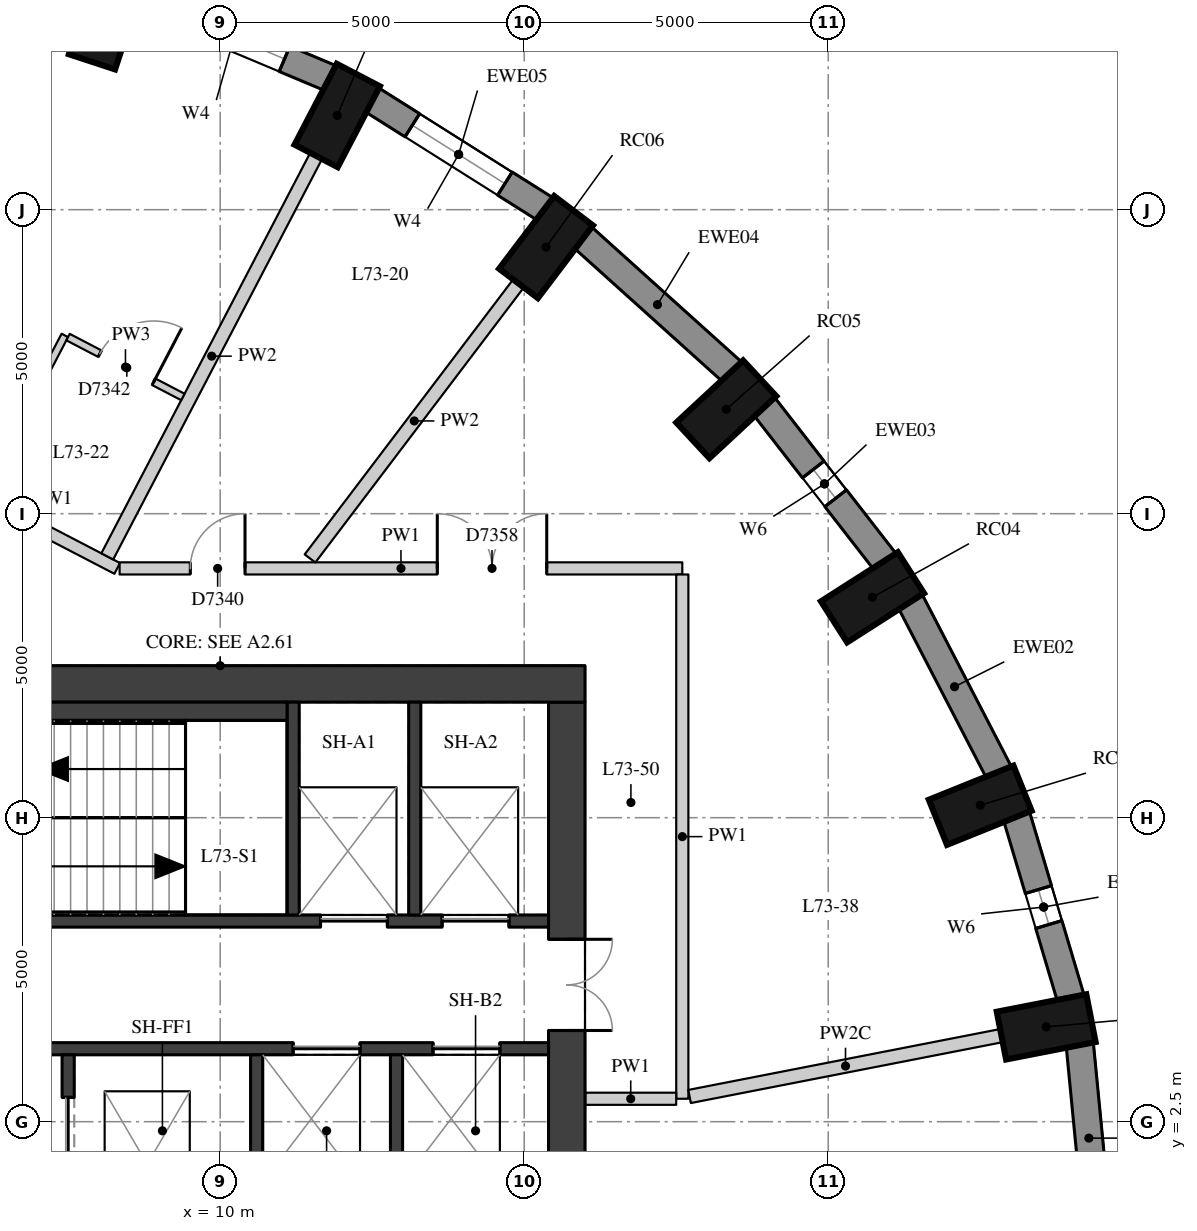
"""IFC4 building model, lengths in metres.
Left out: names, types, materials, properties, quantities, classifications, styles, units other than length and angle.
Written with IfcOpenShell. Run it as: python <this file> out.ifc"""

import sys

from ifc_helpers import new_model, si_unit, direction, frame, frame_2d, origin, origin_2d, place, context, subcontext, project, spatial, rectangle, extrude, element, fill, save


model = new_model("IFC4")
c1 = context("Model", 3, precision=1e-05, world=origin(), true_north=direction((0.0, 1.0)))
c2 = subcontext(c1, "Body", "Model", "MODEL_VIEW")
j1 = project(units=[si_unit("LENGTHUNIT", "METRE"), si_unit("PLANEANGLEUNIT", "RADIAN")], contexts=[c1])
p1 = place(None, origin())
s1 = spatial("IfcSite", under=j1, at=p1, CompositionType="ELEMENT")
p2 = place(p1, origin())
s2 = spatial("IfcBuilding", under=s1, at=p2, CompositionType="ELEMENT")
p3 = place(p2, frame((0.0, 0.0, 256.4)))
s3 = spatial("IfcBuildingStorey", under=s2, at=p3, CompositionType="ELEMENT", Elevation=256.4)
for number, where, z_axis, x_axis in (
    (1, (23.585, 4.06, 0.0), (0.0, 0.0, 1.0), (0.981, 0.192, 0.0)),
    (2, (22.5, 7.705, 0.0), (0.0, 0.0, 1.0), (0.928, 0.374, 0.0)),
    (3, (20.728, 11.125, 0.0), (0.0, 0.0, 1.0), (0.843, 0.539, 0.0)),
    (4, (18.323, 14.216, 0.0), (0.0, 0.0, 1.0), (0.733, 0.681, 0.0)),
    (5, (15.359, 16.885, 0.0), (0.0, 0.0, 1.0), (0.604, 0.797, 0.0)),
    (6, (11.925, 19.05, 0.0), (0.0, 0.0, 1.0), (0.462, 0.887, 0.0)),
    (7, (8.125, 20.644, 0.0), (0.0, 0.0, 1.0), (0.312, 0.95, 0.0)),
):
    element("IfcColumn", number, at=place(p3, frame(where, z_axis=z_axis, x_axis=x_axis)), inside=s3, PredefinedType="COLUMN", context=c2, shape_type="SweptSolid", body=[
        extrude(rectangle(XDim=1.5, YDim=0.8, at=origin_2d()), origin(), (0.0, 0.0, 1.0), 3.3),
    ])
p4 = place(p3, frame((24.437, 0.68, 0.0), z_axis=(0.0, 0.0, 1.0), x_axis=(-0.096740086873, 0.995309678237, 0.0)))
e8 = element("IfcWall", 8, at=p4, inside=s3, PredefinedType="SOLIDWALL", context=c2, shape_type="SweptSolid", body=[
    extrude(rectangle(XDim=3.114, YDim=0.45, at=frame_2d((1.557, 0.0))), origin(), (0.0, 0.0, 1.0), 2.95),
])
p5 = place(p3, frame((23.99, 4.526, 0.0), z_axis=(0.0, 0.0, 1.0), x_axis=(-0.285263800865, 0.958449040855, 0.0)))
e9 = element("IfcWall", 9, at=p5, inside=s3, PredefinedType="SOLIDWALL", context=c2, shape_type="SweptSolid", body=[
    extrude(rectangle(XDim=3.139, YDim=0.45, at=frame_2d((1.57, 0.0))), origin(), (0.0, 0.0, 1.0), 2.95),
])
p6 = place(p5, frame((1.27, 0.0, 0.4)))
e10 = element("IfcOpeningElement", 10, at=p6, cuts=e9, PredefinedType="OPENING", context=c2, shape_type="SweptSolid", body=[
    extrude(rectangle(XDim=0.6, YDim=1.75, at=frame_2d((0.3, 0.875))), frame((0.0, 0.235, 0.0), z_axis=(0.0, -1.0, 0.0), x_axis=(1.0, 0.0, 0.0)), (0.0, 0.0, 1.0), 0.47),
])
p7 = place(p3, frame((22.81, 8.24, 0.0), z_axis=(0.0, 0.0, 1.0), x_axis=(-0.459889857669, 0.887975967475, 0.0)))
e11 = element("IfcWall", 11, at=p7, inside=s3, PredefinedType="SOLIDWALL", context=c2, shape_type="SweptSolid", body=[
    extrude(rectangle(XDim=3.186, YDim=0.45, at=frame_2d((1.593, 0.0))), origin(), (0.0, 0.0, 1.0), 2.95),
])
p8 = place(p3, frame((20.935, 11.708, 0.0), z_axis=(0.0, 0.0, 1.0), x_axis=(-0.613862536705, 0.789412937587, 0.0)))
e12 = element("IfcWall", 12, at=p8, inside=s3, PredefinedType="SOLIDWALL", context=c2, shape_type="SweptSolid", body=[
    extrude(rectangle(XDim=3.247, YDim=0.45, at=frame_2d((1.624, 0.0))), origin(), (0.0, 0.0, 1.0), 2.95),
])
p9 = place(p8, frame((1.324, 0.0, 0.4)))
e13 = element("IfcOpeningElement", 13, at=p9, cuts=e12, PredefinedType="OPENING", context=c2, shape_type="SweptSolid", body=[
    extrude(rectangle(XDim=0.6, YDim=1.75, at=frame_2d((0.3, 0.875))), frame((0.0, 0.235, 0.0), z_axis=(0.0, -1.0, 0.0), x_axis=(1.0, 0.0, 0.0)), (0.0, 0.0, 1.0), 0.47),
])
p10 = place(p3, frame((18.424, 14.828, 0.0), z_axis=(0.0, 0.0, 1.0), x_axis=(-0.743166014219, 0.669107073128, 0.0)))
e14 = element("IfcWall", 14, at=p10, inside=s3, PredefinedType="SOLIDWALL", context=c2, shape_type="SweptSolid", body=[
    extrude(rectangle(XDim=3.316, YDim=0.45, at=frame_2d((1.658, 0.0))), origin(), (0.0, 0.0, 1.0), 2.95),
])
p11 = place(p3, frame((15.353, 17.506, 0.0), z_axis=(0.0, 0.0, 1.0), x_axis=(-0.845929139811, 0.53329531258, 0.0)))
e15 = element("IfcWall", 15, at=p11, inside=s3, PredefinedType="SOLIDWALL", context=c2, shape_type="SweptSolid", body=[
    extrude(rectangle(XDim=3.385, YDim=0.45, at=frame_2d((1.692, 0.0))), origin(), (0.0, 0.0, 1.0), 2.95),
])
p12 = place(p11, frame((0.792, 0.0, 0.4)))
e16 = element("IfcOpeningElement", 16, at=p12, cuts=e15, PredefinedType="OPENING", context=c2, shape_type="SweptSolid", body=[
    extrude(rectangle(XDim=1.8, YDim=1.75, at=frame_2d((0.9, 0.875))), frame((0.0, 0.235, 0.0), z_axis=(0.0, -1.0, 0.0), x_axis=(1.0, 0.0, 0.0)), (0.0, 0.0, 1.0), 0.47),
])
p13 = place(p3, frame((11.816, 19.662, 0.0), z_axis=(0.0, 0.0, 1.0), x_axis=(-0.922024627475, 0.387131226239, 0.0)))
e17 = element("IfcWall", 17, at=p13, inside=s3, PredefinedType="SOLIDWALL", context=c2, shape_type="SweptSolid", body=[
    extrude(rectangle(XDim=3.443, YDim=0.45, at=frame_2d((1.722, 0.0))), origin(), (0.0, 0.0, 1.0), 2.95),
])
p14 = place(p13, frame((0.822, 0.0, 0.4)))
e18 = element("IfcOpeningElement", 18, at=p14, cuts=e17, PredefinedType="OPENING", context=c2, shape_type="SweptSolid", body=[
    extrude(rectangle(XDim=1.8, YDim=1.75, at=frame_2d((0.9, 0.875))), frame((0.0, 0.235, 0.0), z_axis=(0.0, -1.0, 0.0), x_axis=(1.0, 0.0, 0.0)), (0.0, 0.0, 1.0), 0.47),
])
p15 = place(p3, frame((15.7, -9.4, 0.0), z_axis=(0.0, 0.0, 1.0), x_axis=(0.0, 1.0, 0.0)))
e19 = element("IfcWall", 19, at=p15, inside=s3, PredefinedType="SHEAR", context=c2, shape_type="SweptSolid", body=[
    extrude(rectangle(XDim=18.8, YDim=0.6, at=frame_2d((9.4, 0.0))), origin(), (0.0, 0.0, 1.0), 2.95),
])
p16 = place(p15, frame((13.4, 0.0, 0.0)))
e20 = element("IfcOpeningElement", 20, at=p16, cuts=e19, PredefinedType="OPENING", context=c2, shape_type="SweptSolid", body=[
    extrude(rectangle(XDim=1.5, YDim=2.1, at=frame_2d((0.75, 1.05))), frame((0.0, 0.31, 0.0), z_axis=(0.0, -1.0, 0.0), x_axis=(1.0, 0.0, 0.0)), (0.0, 0.0, 1.0), 0.62),
])
p17 = place(p15, frame((3.9, 0.0, 0.0)))
e21 = element("IfcOpeningElement", 21, at=p17, cuts=e19, PredefinedType="OPENING", context=c2, shape_type="SweptSolid", body=[
    extrude(rectangle(XDim=1.5, YDim=2.1, at=frame_2d((0.75, 1.05))), frame((0.0, 0.31, 0.0), z_axis=(0.0, -1.0, 0.0), x_axis=(1.0, 0.0, 0.0)), (0.0, 0.0, 1.0), 0.62),
])
p18 = place(p3, frame((4.0, 9.7, 0.0), z_axis=(0.0, 0.0, 1.0), x_axis=(1.0, 0.0, 0.0)))
e22 = element("IfcWall", 22, at=p18, inside=s3, PredefinedType="SHEAR", context=c2, shape_type="SweptSolid", body=[
    extrude(rectangle(XDim=12.0, YDim=0.6, at=frame_2d((6.0, 0.0))), origin(), (0.0, 0.0, 1.0), 2.95),
])
p19 = place(p3, frame((4.6, 5.8, 0.0), z_axis=(0.0, 0.0, 1.0), x_axis=(1.0, 0.0, 0.0)))
e23 = element("IfcWall", 23, at=p19, inside=s3, PredefinedType="SHEAR", context=c2, shape_type="SweptSolid", body=[
    extrude(rectangle(XDim=10.8, YDim=0.2, at=frame_2d((5.4, 0.0))), origin(), (0.0, 0.0, 1.0), 2.95),
])
p20 = place(p19, frame((7.05, 0.0, 0.0)))
e24 = element("IfcOpeningElement", 24, at=p20, cuts=e23, PredefinedType="OPENING", context=c2, shape_type="SweptSolid", body=[
    extrude(rectangle(XDim=1.1, YDim=2.1, at=frame_2d((0.55, 1.05))), frame((0.0, 0.11, 0.0), z_axis=(0.0, -1.0, 0.0), x_axis=(1.0, 0.0, 0.0)), (0.0, 0.0, 1.0), 0.22),
])
p21 = place(p19, frame((9.05, 0.0, 0.0)))
e25 = element("IfcOpeningElement", 25, at=p21, cuts=e23, PredefinedType="OPENING", context=c2, shape_type="SweptSolid", body=[
    extrude(rectangle(XDim=1.1, YDim=2.1, at=frame_2d((0.55, 1.05))), frame((0.0, 0.11, 0.0), z_axis=(0.0, -1.0, 0.0), x_axis=(1.0, 0.0, 0.0)), (0.0, 0.0, 1.0), 0.22),
])
p22 = place(p3, frame((4.6, 3.7, 0.0), z_axis=(0.0, 0.0, 1.0), x_axis=(1.0, 0.0, 0.0)))
e26 = element("IfcWall", 26, at=p22, inside=s3, PredefinedType="SHEAR", context=c2, shape_type="SweptSolid", body=[
    extrude(rectangle(XDim=10.8, YDim=0.2, at=frame_2d((5.4, 0.0))), origin(), (0.0, 0.0, 1.0), 2.95),
])
p23 = place(p22, frame((6.6, 0.0, 0.0)))
e27 = element("IfcOpeningElement", 27, at=p23, cuts=e26, PredefinedType="OPENING", context=c2, shape_type="SweptSolid", body=[
    extrude(rectangle(XDim=1.1, YDim=2.1, at=frame_2d((0.55, 1.05))), frame((0.0, 0.11, 0.0), z_axis=(0.0, -1.0, 0.0), x_axis=(1.0, 0.0, 0.0)), (0.0, 0.0, 1.0), 0.22),
])
p24 = place(p22, frame((8.9, 0.0, 0.0)))
e28 = element("IfcOpeningElement", 28, at=p24, cuts=e26, PredefinedType="OPENING", context=c2, shape_type="SweptSolid", body=[
    extrude(rectangle(XDim=1.1, YDim=2.1, at=frame_2d((0.55, 1.05))), frame((0.0, 0.11, 0.0), z_axis=(0.0, -1.0, 0.0), x_axis=(1.0, 0.0, 0.0)), (0.0, 0.0, 1.0), 0.22),
])
for number, where, z_axis, x_axis in (
    (29, (11.2, 5.9, 0.0), (0.0, 0.0, 1.0), (0.0, 1.0, 0.0)),
    (30, (13.2, 5.9, 0.0), (0.0, 0.0, 1.0), (0.0, 1.0, 0.0)),
):
    element("IfcWall", number, at=place(p3, frame(where, z_axis=z_axis, x_axis=x_axis)), inside=s3, PredefinedType="SHEAR", context=c2, shape_type="SweptSolid", body=[
        extrude(rectangle(XDim=3.5, YDim=0.2, at=frame_2d((1.75, 0.0))), origin(), (0.0, 0.0, 1.0), 2.95),
    ])
p25 = place(p3, frame((7.5, 1.1, 0.0), z_axis=(0.0, 0.0, 1.0), x_axis=(0.0, 1.0, 0.0)))
e31 = element("IfcWall", 31, at=p25, inside=s3, PredefinedType="SHEAR", context=c2, shape_type="SweptSolid", body=[
    extrude(rectangle(XDim=2.5, YDim=0.2, at=frame_2d((1.25, 0.0))), origin(), (0.0, 0.0, 1.0), 2.95),
])
p26 = place(p25, frame((0.7, 0.0, 0.0)))
e32 = element("IfcOpeningElement", 32, at=p26, cuts=e31, PredefinedType="OPENING", context=c2, shape_type="SweptSolid", body=[
    extrude(rectangle(XDim=1.1, YDim=2.1, at=frame_2d((0.55, 1.05))), frame((0.0, 0.11, 0.0), z_axis=(0.0, -1.0, 0.0), x_axis=(1.0, 0.0, 0.0)), (0.0, 0.0, 1.0), 0.22),
])
for number, where, z_axis, x_axis in (
    (33, (10.6, 1.1, 0.0), (0.0, 0.0, 1.0), (0.0, 1.0, 0.0)),
    (34, (12.9, 1.1, 0.0), (0.0, 0.0, 1.0), (0.0, 1.0, 0.0)),
):
    element("IfcWall", number, at=place(p3, frame(where, z_axis=z_axis, x_axis=x_axis)), inside=s3, PredefinedType="SHEAR", context=c2, shape_type="SweptSolid", body=[
        extrude(rectangle(XDim=2.5, YDim=0.2, at=frame_2d((1.25, 0.0))), origin(), (0.0, 0.0, 1.0), 2.95),
    ])
p27 = place(p3, frame((6.22, 9.25, 0.0), z_axis=(0.0, 0.0, 1.0), x_axis=(1.0, 0.0, 0.0)))
e35 = element("IfcWall", 35, at=p27, inside=s3, PredefinedType="PARTITIONING", context=c2, shape_type="SweptSolid", body=[
    extrude(rectangle(XDim=4.88, YDim=0.3, at=frame_2d((2.44, 0.0))), origin(), (0.0, 0.0, 1.0), 2.95),
])
p28 = place(p3, frame((5.669, 12.971, 0.0), z_axis=(0.0, 0.0, 1.0), x_axis=(0.887284047921, -0.461223393058, 0.0)))
e36 = element("IfcWall", 36, at=p28, inside=s3, PredefinedType="PARTITIONING", context=c2, shape_type="SweptSolid", body=[
    extrude(rectangle(XDim=2.972, YDim=0.2, at=frame_2d((1.486, 0.0))), origin(), (0.0, 0.0, 1.0), 2.95),
])
p29 = place(p3, frame((8.346, 11.6, 0.0), z_axis=(0.0, 0.0, 1.0), x_axis=(1.0, 0.0, 0.0)))
e37 = element("IfcWall", 37, at=p29, inside=s3, PredefinedType="PARTITIONING", context=c2, shape_type="SweptSolid", body=[
    extrude(rectangle(XDim=9.254, YDim=0.2, at=frame_2d((4.627, 0.0))), origin(), (0.0, 0.0, 1.0), 2.95),
])
p30 = place(p29, frame((1.162, 0.0, 0.0)))
e38 = element("IfcOpeningElement", 38, at=p30, cuts=e37, PredefinedType="OPENING", context=c2, shape_type="SweptSolid", body=[
    extrude(rectangle(XDim=0.9, YDim=2.1, at=frame_2d((0.45, 1.05))), frame((0.0, 0.11, 0.0), z_axis=(0.0, -1.0, 0.0), x_axis=(1.0, 0.0, 0.0)), (0.0, 0.0, 1.0), 0.22),
])
p31 = place(p29, frame((5.224, 0.0, 0.0)))
e39 = element("IfcOpeningElement", 39, at=p31, cuts=e37, PredefinedType="OPENING", context=c2, shape_type="SweptSolid", body=[
    extrude(rectangle(XDim=1.8, YDim=2.1, at=frame_2d((0.9, 1.05))), frame((0.0, 0.11, 0.0), z_axis=(0.0, -1.0, 0.0), x_axis=(1.0, 0.0, 0.0)), (0.0, 0.0, 1.0), 0.22),
])
p32 = place(p3, frame((17.6, 11.5, 0.0), z_axis=(0.0, 0.0, 1.0), x_axis=(0.0, -1.0, 0.0)))
e40 = element("IfcWall", 40, at=p32, inside=s3, PredefinedType="PARTITIONING", context=c2, shape_type="SweptSolid", body=[
    extrude(rectangle(XDim=8.623, YDim=0.2, at=frame_2d((4.312, 0.0))), origin(), (0.0, 0.0, 1.0), 2.95),
])
p33 = place(p3, frame((17.5, 2.877, 0.0), z_axis=(0.0, 0.0, 1.0), x_axis=(-1.0, 0.0, 0.0)))
e41 = element("IfcWall", 41, at=p33, inside=s3, PredefinedType="PARTITIONING", context=c2, shape_type="SweptSolid", body=[
    extrude(rectangle(XDim=1.496, YDim=0.2, at=frame_2d((0.748, 0.0))), origin(), (0.0, 0.0, 1.0), 2.95),
])
p34 = place(p3, frame((22.849, 3.916, 0.0), z_axis=(0.0, 0.0, 1.0), x_axis=(-0.981474096155, -0.191594881394, 0.0)))
e42 = element("IfcWall", 42, at=p34, inside=s3, PredefinedType="PARTITIONING", context=c2, shape_type="SweptSolid", body=[
    extrude(rectangle(XDim=5.226, YDim=0.22, at=frame_2d((2.613, 0.0))), origin(), (0.0, 0.0, 1.0), 2.5),
])
p35 = place(p3, frame((14.906, 16.287, 0.0), z_axis=(0.0, 0.0, 1.0), x_axis=(-0.604066355306, -0.796934023861, 0.0)))
e43 = element("IfcWall", 43, at=p35, inside=s3, PredefinedType="PARTITIONING", context=c2, shape_type="SweptSolid", body=[
    extrude(rectangle(XDim=5.676, YDim=0.22, at=frame_2d((2.838, 0.0))), origin(), (0.0, 0.0, 1.0), 2.95),
])
p36 = place(p3, frame((11.578, 18.385, 0.0), z_axis=(0.0, 0.0, 1.0), x_axis=(-0.462371689287, -0.886686202073, 0.0)))
e44 = element("IfcWall", 44, at=p36, inside=s3, PredefinedType="PARTITIONING", context=c2, shape_type="SweptSolid", body=[
    extrude(rectangle(XDim=7.429, YDim=0.22, at=frame_2d((3.714, 0.0))), origin(), (0.0, 0.0, 1.0), 2.95),
])
p37 = place(p3, frame((6.103, 12.858, 0.0), z_axis=(0.0, 0.0, 1.0), x_axis=(0.462353319711, 0.886695780836, 0.0)))
e45 = element("IfcWall", 45, at=p37, inside=s3, PredefinedType="PARTITIONING", context=c2, shape_type="SweptSolid", body=[
    extrude(rectangle(XDim=2.903, YDim=0.12, at=frame_2d((1.452, 0.0))), origin(), (0.0, 0.0, 1.0), 2.95),
])
p38 = place(p3, frame((7.498, 15.405, 0.0), z_axis=(0.0, 0.0, 1.0), x_axis=(0.886662502683, -0.46241713456, 0.0)))
e46 = element("IfcWall", 46, at=p38, inside=s3, PredefinedType="PARTITIONING", context=c2, shape_type="SweptSolid", body=[
    extrude(rectangle(XDim=2.13, YDim=0.12, at=frame_2d((1.065, 0.0))), origin(), (0.0, 0.0, 1.0), 2.95),
])
p39 = place(p38, frame((0.59, 0.0, 0.0)))
e47 = element("IfcOpeningElement", 47, at=p39, cuts=e46, PredefinedType="OPENING", context=c2, shape_type="SweptSolid", body=[
    extrude(rectangle(XDim=1.0, YDim=2.1, at=frame_2d((0.5, 1.05))), frame((0.0, 0.07, 0.0), z_axis=(0.0, -1.0, 0.0), x_axis=(1.0, 0.0, 0.0)), (0.0, 0.0, 1.0), 0.14),
])
p40 = place(p6, origin())
e48 = element("IfcWindow", 48, at=p40, inside=s3, PartitioningType="SINGLE_PANEL", PredefinedType="WINDOW", context=c2, shape_type="SweptSolid", body=[
    extrude(rectangle(XDim=0.6, YDim=1.75, at=frame_2d((0.3, 0.875))), frame((0.0, 0.035, 0.0), z_axis=(0.0, -1.0, 0.0), x_axis=(1.0, 0.0, 0.0)), (0.0, 0.0, 1.0), 0.06),
])
fill(e10, e48)
p41 = place(p9, origin())
e49 = element("IfcWindow", 49, at=p41, inside=s3, PartitioningType="SINGLE_PANEL", PredefinedType="WINDOW", context=c2, shape_type="SweptSolid", body=[
    extrude(rectangle(XDim=0.6, YDim=1.75, at=frame_2d((0.3, 0.875))), frame((0.0, 0.035, 0.0), z_axis=(0.0, -1.0, 0.0), x_axis=(1.0, 0.0, 0.0)), (0.0, 0.0, 1.0), 0.06),
])
fill(e13, e49)
p42 = place(p12, origin())
e50 = element("IfcWindow", 50, at=p42, inside=s3, PartitioningType="SINGLE_PANEL", PredefinedType="WINDOW", context=c2, shape_type="SweptSolid", body=[
    extrude(rectangle(XDim=1.8, YDim=1.75, at=frame_2d((0.9, 0.875))), frame((0.0, 0.035, 0.0), z_axis=(0.0, -1.0, 0.0), x_axis=(1.0, 0.0, 0.0)), (0.0, 0.0, 1.0), 0.06),
])
fill(e16, e50)
p43 = place(p14, origin())
e51 = element("IfcWindow", 51, at=p43, inside=s3, PartitioningType="SINGLE_PANEL", PredefinedType="WINDOW", context=c2, shape_type="SweptSolid", body=[
    extrude(rectangle(XDim=1.8, YDim=1.75, at=frame_2d((0.9, 0.875))), frame((0.0, 0.035, 0.0), z_axis=(0.0, -1.0, 0.0), x_axis=(1.0, 0.0, 0.0)), (0.0, 0.0, 1.0), 0.06),
])
fill(e18, e51)
p44 = place(p16, origin())
e52 = element("IfcDoor", 52, at=p44, inside=s3, OperationType="DOUBLE_DOOR_SINGLE_SWING", PredefinedType="DOOR", context=c2, shape_type="SweptSolid", body=[
    extrude(rectangle(XDim=1.5, YDim=2.1, at=frame_2d((0.75, 1.05))), frame((0.0, 0.025, 0.0), z_axis=(0.0, -1.0, 0.0), x_axis=(1.0, 0.0, 0.0)), (0.0, 0.0, 1.0), 0.05),
])
fill(e20, e52)
p45 = place(p20, origin())
e53 = element("IfcDoor", 53, at=p45, inside=s3, OperationType="DOUBLE_DOOR_SLIDING", PredefinedType="DOOR", context=c2, shape_type="SweptSolid", body=[
    extrude(rectangle(XDim=1.1, YDim=2.1, at=frame_2d((0.55, 1.05))), frame((0.0, 0.025, 0.0), z_axis=(0.0, -1.0, 0.0), x_axis=(1.0, 0.0, 0.0)), (0.0, 0.0, 1.0), 0.05),
])
fill(e24, e53)
p46 = place(p21, origin())
e54 = element("IfcDoor", 54, at=p46, inside=s3, OperationType="DOUBLE_DOOR_SLIDING", PredefinedType="DOOR", context=c2, shape_type="SweptSolid", body=[
    extrude(rectangle(XDim=1.1, YDim=2.1, at=frame_2d((0.55, 1.05))), frame((0.0, 0.025, 0.0), z_axis=(0.0, -1.0, 0.0), x_axis=(1.0, 0.0, 0.0)), (0.0, 0.0, 1.0), 0.05),
])
fill(e25, e54)
p47 = place(p23, origin())
e55 = element("IfcDoor", 55, at=p47, inside=s3, OperationType="DOUBLE_DOOR_SLIDING", PredefinedType="DOOR", context=c2, shape_type="SweptSolid", body=[
    extrude(rectangle(XDim=1.1, YDim=2.1, at=frame_2d((0.55, 1.05))), frame((0.0, 0.025, 0.0), z_axis=(0.0, -1.0, 0.0), x_axis=(1.0, 0.0, 0.0)), (0.0, 0.0, 1.0), 0.05),
])
fill(e27, e55)
p48 = place(p24, origin())
e56 = element("IfcDoor", 56, at=p48, inside=s3, OperationType="DOUBLE_DOOR_SLIDING", PredefinedType="DOOR", context=c2, shape_type="SweptSolid", body=[
    extrude(rectangle(XDim=1.1, YDim=2.1, at=frame_2d((0.55, 1.05))), frame((0.0, 0.025, 0.0), z_axis=(0.0, -1.0, 0.0), x_axis=(1.0, 0.0, 0.0)), (0.0, 0.0, 1.0), 0.05),
])
fill(e28, e56)
p49 = place(p26, origin())
e57 = element("IfcDoor", 57, at=p49, inside=s3, OperationType="DOUBLE_DOOR_SLIDING", PredefinedType="DOOR", context=c2, shape_type="SweptSolid", body=[
    extrude(rectangle(XDim=1.1, YDim=2.1, at=frame_2d((0.55, 1.05))), frame((0.0, 0.025, 0.0), z_axis=(0.0, -1.0, 0.0), x_axis=(1.0, 0.0, 0.0)), (0.0, 0.0, 1.0), 0.05),
])
fill(e32, e57)
p50 = place(p30, origin())
e58 = element("IfcDoor", 58, at=p50, inside=s3, OperationType="SINGLE_SWING_RIGHT", PredefinedType="DOOR", context=c2, shape_type="SweptSolid", body=[
    extrude(rectangle(XDim=0.9, YDim=2.1, at=frame_2d((0.45, 1.05))), frame((0.0, 0.025, 0.0), z_axis=(0.0, -1.0, 0.0), x_axis=(1.0, 0.0, 0.0)), (0.0, 0.0, 1.0), 0.05),
])
fill(e38, e58)
p51 = place(p39, origin())
e59 = element("IfcDoor", 59, at=p51, inside=s3, OperationType="SINGLE_SWING_RIGHT", PredefinedType="DOOR", context=c2, shape_type="SweptSolid", body=[
    extrude(rectangle(XDim=1.0, YDim=2.1, at=frame_2d((0.5, 1.05))), frame((0.0, 0.025, 0.0), z_axis=(0.0, -1.0, 0.0), x_axis=(1.0, 0.0, 0.0)), (0.0, 0.0, 1.0), 0.05),
])
fill(e47, e59)
p52 = place(p31, origin())
e60 = element("IfcDoor", 60, at=p52, inside=s3, OperationType="DOUBLE_DOOR_SINGLE_SWING", PredefinedType="DOOR", context=c2, shape_type="SweptSolid", body=[
    extrude(rectangle(XDim=1.8, YDim=2.1, at=frame_2d((0.9, 1.05))), frame((0.0, 0.025, 0.0), z_axis=(0.0, -1.0, 0.0), x_axis=(1.0, 0.0, 0.0)), (0.0, 0.0, 1.0), 0.05),
])
fill(e39, e60)
save(model, sys.argv[1])
